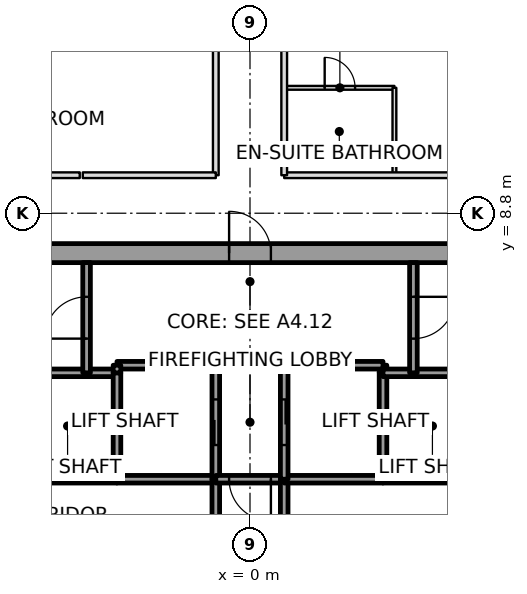
"""IFC4 building model, lengths in metres.
Left out: names, types, materials, properties, quantities, classifications, styles, units other than length and angle.
Written with IfcOpenShell. Run it as: python <this file> out.ifc"""

import sys

from ifc_helpers import new_model, si_unit, direction, frame, frame_2d, origin, place, context, subcontext, project, spatial, rectangle, extrude, element, fill, save


model = new_model("IFC4")
c1 = context("Model", 3, precision=1e-05, world=origin(), true_north=direction((0.0, 1.0)))
c2 = subcontext(c1, "Body", "Model", "MODEL_VIEW")
j1 = project(units=[si_unit("LENGTHUNIT", "METRE"), si_unit("PLANEANGLEUNIT", "RADIAN")], contexts=[c1])
p1 = place(None, origin())
s1 = spatial("IfcSite", under=j1, at=p1, CompositionType="ELEMENT")
p2 = place(p1, origin())
s2 = spatial("IfcBuilding", under=s1, at=p2, CompositionType="ELEMENT")
p3 = place(p2, frame((0.0, 0.0, 59.1)))
s3 = spatial("IfcBuildingStorey", under=s2, at=p3, CompositionType="ELEMENT", Elevation=59.1)
p4 = place(p3, frame((-11.0, 7.75, 0.0), z_axis=(0.0, 0.0, 1.0), x_axis=(1.0, 0.0, 0.0)))
e1 = element("IfcWall", 1, at=p4, inside=s3, PredefinedType="SHEAR", context=c2, shape_type="SweptSolid", body=[
    extrude(rectangle(XDim=22.0, YDim=0.5, at=frame_2d((11.0, 0.0))), origin(), (0.0, 0.0, 1.0), 3.7),
])
p5 = place(p4, frame((10.45, 0.0, 0.0)))
e2 = element("IfcOpeningElement", 2, at=p5, cuts=e1, PredefinedType="OPENING", context=c2, shape_type="SweptSolid", body=[
    extrude(rectangle(XDim=1.1, YDim=2.1, at=frame_2d((0.55, 1.05))), frame((0.0, 0.25, 0.0), z_axis=(0.0, -1.0, 0.0), x_axis=(1.0, 0.0, 0.0)), (0.0, 0.0, 1.0), 0.5),
])
p6 = place(p3, frame((-3.5, 1.8, 0.0), z_axis=(0.0, 0.0, 1.0), x_axis=(-1.0, 0.0, 0.0)))
e3 = element("IfcWall", 3, at=p6, inside=s3, PredefinedType="SOLIDWALL", context=c2, shape_type="SweptSolid", body=[
    extrude(rectangle(XDim=2.6, YDim=0.2, at=frame_2d((1.3, 0.0))), origin(), (0.0, 0.0, 1.0), 3.55),
])
p7 = place(p3, frame((-4.3, 4.6, 0.0), z_axis=(0.0, 0.0, 1.0), x_axis=(-1.0, 0.0, 0.0)))
e4 = element("IfcWall", 4, at=p7, inside=s3, PredefinedType="SOLIDWALL", context=c2, shape_type="SweptSolid", body=[
    extrude(rectangle(XDim=1.8, YDim=0.2, at=frame_2d((0.9, 0.0))), origin(), (0.0, 0.0, 1.0), 3.55),
])
p8 = place(p3, frame((-3.5, 4.6, 0.0), z_axis=(0.0, 0.0, 1.0), x_axis=(-1.0, 0.0, 0.0)))
e5 = element("IfcWall", 5, at=p8, inside=s3, PredefinedType="SOLIDWALL", context=c2, shape_type="SweptSolid", body=[
    extrude(rectangle(XDim=0.8, YDim=0.2, at=frame_2d((0.4, 0.0))), origin(), (0.0, 0.0, 1.0), 3.55),
])
p9 = place(p3, frame((-4.3, 4.6, 0.0), z_axis=(0.0, 0.0, 1.0), x_axis=(0.0, 1.0, 0.0)))
e6 = element("IfcWall", 6, at=p9, inside=s3, PredefinedType="SOLIDWALL", context=c2, shape_type="SweptSolid", body=[
    extrude(rectangle(XDim=2.9, YDim=0.2, at=frame_2d((1.45, 0.0))), origin(), (0.0, 0.0, 1.0), 3.55),
])
p10 = place(p9, frame((0.9, 0.0, 0.0)))
e7 = element("IfcOpeningElement", 7, at=p10, cuts=e6, PredefinedType="OPENING", context=c2, shape_type="SweptSolid", body=[
    extrude(rectangle(XDim=1.1, YDim=2.1, at=frame_2d((0.55, 1.05))), frame((0.0, 0.1, 0.0), z_axis=(0.0, -1.0, 0.0), x_axis=(1.0, 0.0, 0.0)), (0.0, 0.0, 1.0), 0.2),
])
p11 = place(p3, frame((-0.9, 1.8, 0.0), z_axis=(0.0, 0.0, 1.0), x_axis=(-1.0, 0.0, 0.0)))
e8 = element("IfcWall", 8, at=p11, inside=s3, PredefinedType="SOLIDWALL", context=c2, shape_type="SweptSolid", body=[
    extrude(rectangle(XDim=2.6, YDim=0.2, at=frame_2d((1.3, 0.0))), origin(), (0.0, 0.0, 1.0), 3.55),
])
p12 = place(p3, frame((-3.5, 4.6, 0.0), z_axis=(0.0, 0.0, 1.0), x_axis=(0.0, -1.0, 0.0)))
e9 = element("IfcWall", 9, at=p12, inside=s3, PredefinedType="SOLIDWALL", context=c2, shape_type="SweptSolid", body=[
    extrude(rectangle(XDim=2.8, YDim=0.2, at=frame_2d((1.4, 0.0))), origin(), (0.0, 0.0, 1.0), 3.55),
])
p13 = place(p3, frame((-0.9, 1.8, 0.0), z_axis=(0.0, 0.0, 1.0), x_axis=(0.0, 1.0, 0.0)))
e10 = element("IfcWall", 10, at=p13, inside=s3, PredefinedType="SOLIDWALL", context=c2, shape_type="SweptSolid", body=[
    extrude(rectangle(XDim=3.0, YDim=0.2, at=frame_2d((1.5, 0.0))), origin(), (0.0, 0.0, 1.0), 3.55),
])
p14 = place(p13, frame((0.9, 0.0, 0.0)))
e11 = element("IfcOpeningElement", 11, at=p14, cuts=e10, PredefinedType="OPENING", context=c2, shape_type="SweptSolid", body=[
    extrude(rectangle(XDim=1.2, YDim=2.1, at=frame_2d((0.6, 1.05))), frame((0.0, 0.1, 0.0), z_axis=(0.0, -1.0, 0.0), x_axis=(1.0, 0.0, 0.0)), (0.0, 0.0, 1.0), 0.2),
])
p15 = place(p3, frame((-0.9, 4.8, 0.0), z_axis=(0.0, 0.0, 1.0), x_axis=(-1.0, 0.0, 0.0)))
e12 = element("IfcWall", 12, at=p15, inside=s3, PredefinedType="SOLIDWALL", context=c2, shape_type="SweptSolid", body=[
    extrude(rectangle(XDim=2.6, YDim=0.2, at=frame_2d((1.3, 0.0))), origin(), (0.0, 0.0, 1.0), 3.55),
])
p16 = place(p3, frame((-3.5, 4.8, 0.0), z_axis=(0.0, 0.0, 1.0), x_axis=(0.0, -1.0, 0.0)))
e13 = element("IfcWall", 13, at=p16, inside=s3, PredefinedType="SOLIDWALL", context=c2, shape_type="SweptSolid", body=[
    extrude(rectangle(XDim=0.2, YDim=0.2, at=frame_2d((0.1, 0.0))), origin(), (0.0, 0.0, 1.0), 3.55),
])
p17 = place(p3, frame((-0.9, 1.8, 0.0), z_axis=(0.0, 0.0, 1.0), x_axis=(0.0, -1.0, 0.0)))
e14 = element("IfcWall", 14, at=p17, inside=s3, PredefinedType="SOLIDWALL", context=c2, shape_type="SweptSolid", body=[
    extrude(rectangle(XDim=3.6, YDim=0.2, at=frame_2d((1.8, 0.0))), origin(), (0.0, 0.0, 1.0), 3.55),
])
p18 = place(p17, frame((1.05, 0.0, 0.0)))
e15 = element("IfcOpeningElement", 15, at=p18, cuts=e14, PredefinedType="OPENING", context=c2, shape_type="SweptSolid", body=[
    extrude(rectangle(XDim=1.5, YDim=2.1, at=frame_2d((0.75, 1.05))), frame((0.0, 0.1, 0.0), z_axis=(0.0, -1.0, 0.0), x_axis=(1.0, 0.0, 0.0)), (0.0, 0.0, 1.0), 0.2),
])
p19 = place(p3, frame((0.9, 1.8, 0.0), z_axis=(0.0, 0.0, 1.0), x_axis=(-1.0, 0.0, 0.0)))
e16 = element("IfcWall", 16, at=p19, inside=s3, PredefinedType="SOLIDWALL", context=c2, shape_type="SweptSolid", body=[
    extrude(rectangle(XDim=1.8, YDim=0.2, at=frame_2d((0.9, 0.0))), origin(), (0.0, 0.0, 1.0), 3.55),
])
p20 = place(p19, frame((0.35, 0.0, 0.0)))
e17 = element("IfcOpeningElement", 17, at=p20, cuts=e16, PredefinedType="OPENING", context=c2, shape_type="SweptSolid", body=[
    extrude(rectangle(XDim=1.1, YDim=2.1, at=frame_2d((0.55, 1.05))), frame((0.0, 0.1, 0.0), z_axis=(0.0, -1.0, 0.0), x_axis=(1.0, 0.0, 0.0)), (0.0, 0.0, 1.0), 0.2),
])
p21 = place(p3, frame((0.9, -1.8, 0.0), z_axis=(0.0, 0.0, 1.0), x_axis=(0.0, 1.0, 0.0)))
e18 = element("IfcWall", 18, at=p21, inside=s3, PredefinedType="SOLIDWALL", context=c2, shape_type="SweptSolid", body=[
    extrude(rectangle(XDim=3.6, YDim=0.2, at=frame_2d((1.8, 0.0))), origin(), (0.0, 0.0, 1.0), 3.55),
])
p22 = place(p21, frame((1.05, 0.0, 0.0)))
e19 = element("IfcOpeningElement", 19, at=p22, cuts=e18, PredefinedType="OPENING", context=c2, shape_type="SweptSolid", body=[
    extrude(rectangle(XDim=1.5, YDim=2.1, at=frame_2d((0.75, 1.05))), frame((0.0, 0.1, 0.0), z_axis=(0.0, -1.0, 0.0), x_axis=(1.0, 0.0, 0.0)), (0.0, 0.0, 1.0), 0.2),
])
p23 = place(p3, frame((3.5, 1.8, 0.0), z_axis=(0.0, 0.0, 1.0), x_axis=(-1.0, 0.0, 0.0)))
e20 = element("IfcWall", 20, at=p23, inside=s3, PredefinedType="SOLIDWALL", context=c2, shape_type="SweptSolid", body=[
    extrude(rectangle(XDim=2.6, YDim=0.2, at=frame_2d((1.3, 0.0))), origin(), (0.0, 0.0, 1.0), 3.55),
])
p24 = place(p3, frame((3.5, 4.6, 0.0), z_axis=(0.0, 0.0, 1.0), x_axis=(0.0, 1.0, 0.0)))
e21 = element("IfcWall", 21, at=p24, inside=s3, PredefinedType="SOLIDWALL", context=c2, shape_type="SweptSolid", body=[
    extrude(rectangle(XDim=0.2, YDim=0.2, at=frame_2d((0.1, 0.0))), origin(), (0.0, 0.0, 1.0), 3.55),
])
p25 = place(p3, frame((3.5, 4.8, 0.0), z_axis=(0.0, 0.0, 1.0), x_axis=(-1.0, 0.0, 0.0)))
e22 = element("IfcWall", 22, at=p25, inside=s3, PredefinedType="SOLIDWALL", context=c2, shape_type="SweptSolid", body=[
    extrude(rectangle(XDim=2.6, YDim=0.2, at=frame_2d((1.3, 0.0))), origin(), (0.0, 0.0, 1.0), 3.55),
])
p26 = place(p3, frame((0.9, 4.8, 0.0), z_axis=(0.0, 0.0, 1.0), x_axis=(0.0, -1.0, 0.0)))
e23 = element("IfcWall", 23, at=p26, inside=s3, PredefinedType="SOLIDWALL", context=c2, shape_type="SweptSolid", body=[
    extrude(rectangle(XDim=3.0, YDim=0.2, at=frame_2d((1.5, 0.0))), origin(), (0.0, 0.0, 1.0), 3.55),
])
p27 = place(p26, frame((0.9, 0.0, 0.0)))
e24 = element("IfcOpeningElement", 24, at=p27, cuts=e23, PredefinedType="OPENING", context=c2, shape_type="SweptSolid", body=[
    extrude(rectangle(XDim=1.2, YDim=2.1, at=frame_2d((0.6, 1.05))), frame((0.0, 0.1, 0.0), z_axis=(0.0, -1.0, 0.0), x_axis=(1.0, 0.0, 0.0)), (0.0, 0.0, 1.0), 0.2),
])
p28 = place(p3, frame((6.1, 1.8, 0.0), z_axis=(0.0, 0.0, 1.0), x_axis=(-1.0, 0.0, 0.0)))
e25 = element("IfcWall", 25, at=p28, inside=s3, PredefinedType="SOLIDWALL", context=c2, shape_type="SweptSolid", body=[
    extrude(rectangle(XDim=2.6, YDim=0.2, at=frame_2d((1.3, 0.0))), origin(), (0.0, 0.0, 1.0), 3.55),
])
p29 = place(p3, frame((3.5, 1.8, 0.0), z_axis=(0.0, 0.0, 1.0), x_axis=(0.0, 1.0, 0.0)))
e26 = element("IfcWall", 26, at=p29, inside=s3, PredefinedType="SOLIDWALL", context=c2, shape_type="SweptSolid", body=[
    extrude(rectangle(XDim=2.8, YDim=0.2, at=frame_2d((1.4, 0.0))), origin(), (0.0, 0.0, 1.0), 3.55),
])
p30 = place(p3, frame((4.3, 4.6, 0.0), z_axis=(0.0, 0.0, 1.0), x_axis=(-1.0, 0.0, 0.0)))
e27 = element("IfcWall", 27, at=p30, inside=s3, PredefinedType="SOLIDWALL", context=c2, shape_type="SweptSolid", body=[
    extrude(rectangle(XDim=0.8, YDim=0.2, at=frame_2d((0.4, 0.0))), origin(), (0.0, 0.0, 1.0), 3.55),
])
p31 = place(p3, frame((6.1, 4.6, 0.0), z_axis=(0.0, 0.0, 1.0), x_axis=(-1.0, 0.0, 0.0)))
e28 = element("IfcWall", 28, at=p31, inside=s3, PredefinedType="SOLIDWALL", context=c2, shape_type="SweptSolid", body=[
    extrude(rectangle(XDim=1.8, YDim=0.2, at=frame_2d((0.9, 0.0))), origin(), (0.0, 0.0, 1.0), 3.55),
])
p32 = place(p3, frame((4.3, 7.5, 0.0), z_axis=(0.0, 0.0, 1.0), x_axis=(0.0, -1.0, 0.0)))
e29 = element("IfcWall", 29, at=p32, inside=s3, PredefinedType="SOLIDWALL", context=c2, shape_type="SweptSolid", body=[
    extrude(rectangle(XDim=2.9, YDim=0.2, at=frame_2d((1.45, 0.0))), origin(), (0.0, 0.0, 1.0), 3.55),
])
p33 = place(p32, frame((0.9, 0.0, 0.0)))
e30 = element("IfcOpeningElement", 30, at=p33, cuts=e29, PredefinedType="OPENING", context=c2, shape_type="SweptSolid", body=[
    extrude(rectangle(XDim=1.1, YDim=2.1, at=frame_2d((0.55, 1.05))), frame((0.0, 0.1, 0.0), z_axis=(0.0, -1.0, 0.0), x_axis=(1.0, 0.0, 0.0)), (0.0, 0.0, 1.0), 0.2),
])
p34 = place(p3, frame((-4.48, 9.8, 0.0), z_axis=(0.0, 0.0, 1.0), x_axis=(-1.0, 0.0, 0.0)))
e31 = element("IfcWall", 31, at=p34, inside=s3, PredefinedType="PARTITIONING", context=c2, shape_type="SweptSolid", body=[
    extrude(rectangle(XDim=8.24, YDim=0.15, at=frame_2d((4.12, 0.0))), origin(), (0.0, 0.0, 1.0), 2.947),
])
p35 = place(p34, frame((6.78, 0.0, 0.0)))
e32 = element("IfcOpeningElement", 32, at=p35, cuts=e31, PredefinedType="OPENING", context=c2, shape_type="SweptSolid", body=[
    extrude(rectangle(XDim=1.0, YDim=2.1, at=frame_2d((0.5, 1.05))), frame((0.0, 0.075, 0.0), z_axis=(0.0, -1.0, 0.0), x_axis=(1.0, 0.0, 0.0)), (0.0, 0.0, 1.0), 0.15),
])
p36 = place(p3, frame((-0.9, 27.284, 0.0), z_axis=(0.0, 0.0, 1.0), x_axis=(0.0, -1.0, 0.0)))
e33 = element("IfcWall", 33, at=p36, inside=s3, PredefinedType="PARTITIONING", context=c2, shape_type="SweptSolid", body=[
    extrude(rectangle(XDim=17.484, YDim=0.15, at=frame_2d((8.742, 0.0))), origin(), (0.0, 0.0, 1.0), 2.947),
])
p37 = place(p36, frame((9.402, 0.0, 0.0)))
e34 = element("IfcOpeningElement", 34, at=p37, cuts=e33, PredefinedType="OPENING", context=c2, shape_type="SweptSolid", body=[
    extrude(rectangle(XDim=1.0, YDim=2.1, at=frame_2d((0.5, 1.05))), frame((0.0, 0.075, 0.0), z_axis=(0.0, -1.0, 0.0), x_axis=(1.0, 0.0, 0.0)), (0.0, 0.0, 1.0), 0.15),
])
p38 = place(p3, frame((-0.9, 9.8, 0.0), z_axis=(0.0, 0.0, 1.0), x_axis=(-1.0, 0.0, 0.0)))
e35 = element("IfcWall", 35, at=p38, inside=s3, PredefinedType="PARTITIONING", context=c2, shape_type="SweptSolid", body=[
    extrude(rectangle(XDim=3.5, YDim=0.15, at=frame_2d((1.75, 0.0))), origin(), (0.0, 0.0, 1.0), 2.947),
])
p39 = place(p3, frame((9.22, 9.8, 0.0), z_axis=(0.0, 0.0, 1.0), x_axis=(-1.0, 0.0, 0.0)))
e36 = element("IfcWall", 36, at=p39, inside=s3, PredefinedType="PARTITIONING", context=c2, shape_type="SweptSolid", body=[
    extrude(rectangle(XDim=8.32, YDim=0.15, at=frame_2d((4.16, 0.0))), origin(), (0.0, 0.0, 1.0), 2.947),
])
p40 = place(p3, frame((0.9, 9.8, 0.0), z_axis=(0.0, 0.0, 1.0), x_axis=(0.0, 1.0, 0.0)))
e37 = element("IfcWall", 37, at=p40, inside=s3, PredefinedType="PARTITIONING", context=c2, shape_type="SweptSolid", body=[
    extrude(rectangle(XDim=17.484, YDim=0.15, at=frame_2d((8.742, 0.0))), origin(), (0.0, 0.0, 1.0), 2.947),
])
p41 = place(p40, frame((9.482, 0.0, 0.0)))
e38 = element("IfcOpeningElement", 38, at=p41, cuts=e37, PredefinedType="OPENING", context=c2, shape_type="SweptSolid", body=[
    extrude(rectangle(XDim=1.0, YDim=2.1, at=frame_2d((0.5, 1.05))), frame((0.0, 0.075, 0.0), z_axis=(0.0, -1.0, 0.0), x_axis=(1.0, 0.0, 0.0)), (0.0, 0.0, 1.0), 0.15),
])
p42 = place(p3, frame((0.93, 12.1, 0.0), z_axis=(0.0, 0.0, 1.0), x_axis=(1.0, 0.0, 0.0)))
e39 = element("IfcWall", 39, at=p42, inside=s3, PredefinedType="PARTITIONING", context=c2, shape_type="SweptSolid", body=[
    extrude(rectangle(XDim=2.87, YDim=0.1, at=frame_2d((1.435, 0.0))), origin(), (0.0, 0.0, 1.0), 3.15),
])
p43 = place(p42, frame((1.035, 0.0, 0.0)))
e40 = element("IfcOpeningElement", 40, at=p43, cuts=e39, PredefinedType="OPENING", context=c2, shape_type="SweptSolid", body=[
    extrude(rectangle(XDim=0.8, YDim=2.1, at=frame_2d((0.4, 1.05))), frame((0.0, 0.05, 0.0), z_axis=(0.0, -1.0, 0.0), x_axis=(1.0, 0.0, 0.0)), (0.0, 0.0, 1.0), 0.1),
])
p44 = place(p3, frame((3.8, 12.1, 0.0), z_axis=(0.0, 0.0, 1.0), x_axis=(0.0, -1.0, 0.0)))
e41 = element("IfcWall", 41, at=p44, inside=s3, PredefinedType="PARTITIONING", context=c2, shape_type="SweptSolid", body=[
    extrude(rectangle(XDim=2.27, YDim=0.1, at=frame_2d((1.135, 0.0))), origin(), (0.0, 0.0, 1.0), 3.15),
])
p45 = place(p43, origin())
e42 = element("IfcDoor", 42, at=p45, inside=s3, OperationType="SINGLE_SWING_LEFT", PredefinedType="DOOR", context=c2, shape_type="SweptSolid", body=[
    extrude(rectangle(XDim=0.8, YDim=2.1, at=frame_2d((0.4, 1.05))), frame((0.0, 0.025, 0.0), z_axis=(0.0, -1.0, 0.0), x_axis=(1.0, 0.0, 0.0)), (0.0, 0.0, 1.0), 0.05),
])
fill(e40, e42)
p46 = place(p14, origin())
e43 = element("IfcDoor", 43, at=p46, inside=s3, OperationType="SLIDING_TO_RIGHT", PredefinedType="DOOR", context=c2, shape_type="SweptSolid", body=[
    extrude(rectangle(XDim=1.2, YDim=2.1, at=frame_2d((0.6, 1.05))), frame((0.0, 0.025, 0.0), z_axis=(0.0, -1.0, 0.0), x_axis=(1.0, 0.0, 0.0)), (0.0, 0.0, 1.0), 0.05),
])
fill(e11, e43)
p47 = place(p27, origin())
e44 = element("IfcDoor", 44, at=p47, inside=s3, OperationType="SLIDING_TO_LEFT", PredefinedType="DOOR", context=c2, shape_type="SweptSolid", body=[
    extrude(rectangle(XDim=1.2, YDim=2.1, at=frame_2d((0.6, 1.05))), frame((0.0, 0.025, 0.0), z_axis=(0.0, -1.0, 0.0), x_axis=(1.0, 0.0, 0.0)), (0.0, 0.0, 1.0), 0.05),
])
fill(e24, e44)
p48 = place(p20, origin())
e45 = element("IfcDoor", 45, at=p48, inside=s3, OperationType="SINGLE_SWING_RIGHT", PredefinedType="DOOR", context=c2, shape_type="SweptSolid", body=[
    extrude(rectangle(XDim=1.1, YDim=2.1, at=frame_2d((0.55, 1.05))), frame((0.0, 0.025, 0.0), z_axis=(0.0, -1.0, 0.0), x_axis=(1.0, 0.0, 0.0)), (0.0, 0.0, 1.0), 0.05),
])
fill(e17, e45)
p49 = place(p10, origin())
e46 = element("IfcDoor", 46, at=p49, inside=s3, OperationType="SINGLE_SWING_RIGHT", PredefinedType="DOOR", context=c2, shape_type="SweptSolid", body=[
    extrude(rectangle(XDim=1.1, YDim=2.1, at=frame_2d((0.55, 1.05))), frame((0.0, 0.025, 0.0), z_axis=(0.0, -1.0, 0.0), x_axis=(1.0, 0.0, 0.0)), (0.0, 0.0, 1.0), 0.05),
])
fill(e7, e46)
p50 = place(p33, origin())
e47 = element("IfcDoor", 47, at=p50, inside=s3, OperationType="SINGLE_SWING_LEFT", PredefinedType="DOOR", context=c2, shape_type="SweptSolid", body=[
    extrude(rectangle(XDim=1.1, YDim=2.1, at=frame_2d((0.55, 1.05))), frame((0.0, 0.025, 0.0), z_axis=(0.0, -1.0, 0.0), x_axis=(1.0, 0.0, 0.0)), (0.0, 0.0, 1.0), 0.05),
])
fill(e30, e47)
p51 = place(p5, origin())
e48 = element("IfcDoor", 48, at=p51, inside=s3, OperationType="SINGLE_SWING_LEFT", PredefinedType="DOOR", context=c2, shape_type="SweptSolid", body=[
    extrude(rectangle(XDim=1.1, YDim=2.1, at=frame_2d((0.55, 1.05))), frame((0.0, 0.025, 0.0), z_axis=(0.0, -1.0, 0.0), x_axis=(1.0, 0.0, 0.0)), (0.0, 0.0, 1.0), 0.05),
])
fill(e2, e48)
save(model, sys.argv[1])
